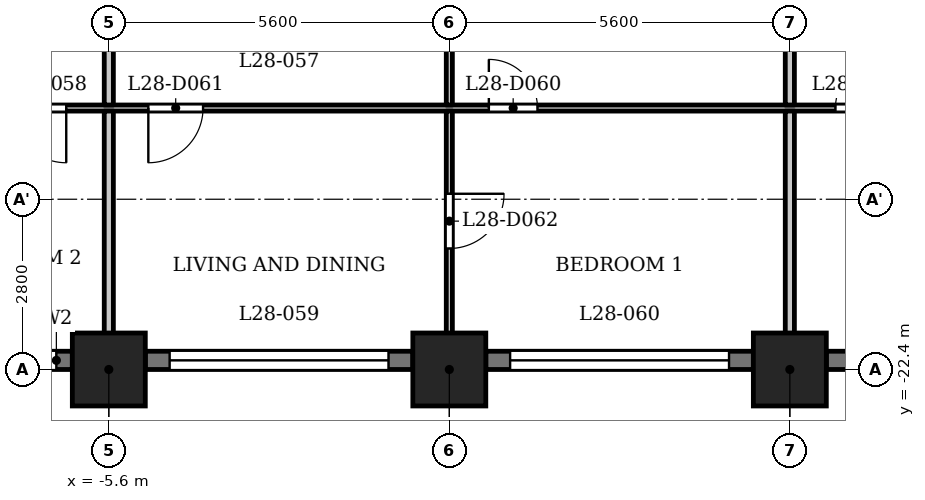
"""IFC4 building model, lengths in metres.
Left out: names, types, materials, properties, quantities, classifications, styles, units other than length and angle.
Written with IfcOpenShell. Run it as: python <this file> out.ifc"""

import sys

from ifc_helpers import new_model, si_unit, direction, frame, frame_2d, origin, origin_2d, place, context, subcontext, project, spatial, rectangle, extrude, element, fill, save


model = new_model("IFC4")
c1 = context("Model", 3, precision=1e-05, world=origin(), true_north=direction((0.0, 1.0)))
c2 = subcontext(c1, "Body", "Model", "MODEL_VIEW")
j1 = project(units=[si_unit("LENGTHUNIT", "METRE"), si_unit("PLANEANGLEUNIT", "RADIAN")], contexts=[c1])
p1 = place(None, origin())
s1 = spatial("IfcSite", under=j1, at=p1, CompositionType="ELEMENT")
p2 = place(p1, origin())
s2 = spatial("IfcBuilding", under=s1, at=p2, CompositionType="ELEMENT")
p3 = place(p2, frame((0.0, 0.0, 111.3)))
s3 = spatial("IfcBuildingStorey", under=s2, at=p3, CompositionType="ELEMENT", Elevation=111.3)
for number, where, z_axis, x_axis in (
    (1, (-5.6, -22.4, 0.0), (0.0, 0.0, 1.0), (1.0, 0.0, 0.0)),
    (2, (0.0, -22.4, 0.0), (0.0, 0.0, 1.0), (1.0, 0.0, 0.0)),
    (3, (5.6, -22.4, 0.0), (0.0, 0.0, 1.0), (1.0, 0.0, 0.0)),
):
    element("IfcColumn", number, at=place(p3, frame(where, z_axis=z_axis, x_axis=x_axis)), inside=s3, PredefinedType="COLUMN", context=c2, shape_type="SweptSolid", body=[
        extrude(rectangle(XDim=1.2, YDim=1.2, at=origin_2d()), origin(), (0.0, 0.0, 1.0), 3.5),
    ])
p4 = place(p3, frame((-10.6, -22.25, 0.0), z_axis=(0.0, 0.0, 1.0), x_axis=(1.0, 0.0, 0.0)))
e4 = element("IfcWall", 4, at=p4, inside=s3, PredefinedType="SOLIDWALL", context=c2, shape_type="SweptSolid", body=[
    extrude(rectangle(XDim=4.4, YDim=0.3, at=frame_2d((2.2, 0.0))), origin(), (0.0, 0.0, 1.0), 2.4),
])
p5 = place(p4, frame((0.363, 0.0, 0.6)))
e5 = element("IfcOpeningElement", 5, at=p5, cuts=e4, PredefinedType="OPENING", context=c2, shape_type="SweptSolid", body=[
    extrude(rectangle(XDim=1.2, YDim=1.55, at=frame_2d((0.6, 0.775))), frame((0.0, 0.16, 0.0), z_axis=(0.0, -1.0, 0.0), x_axis=(1.0, 0.0, 0.0)), (0.0, 0.0, 1.0), 0.32),
])
p6 = place(p4, frame((2.337, 0.0, 0.9)))
e6 = element("IfcOpeningElement", 6, at=p6, cuts=e4, PredefinedType="OPENING", context=c2, shape_type="SweptSolid", body=[
    extrude(rectangle(XDim=1.8, YDim=1.25, at=frame_2d((0.9, 0.625))), frame((0.0, 0.16, 0.0), z_axis=(0.0, -1.0, 0.0), x_axis=(1.0, 0.0, 0.0)), (0.0, 0.0, 1.0), 0.32),
])
p7 = place(p3, frame((-5.0, -22.25, 0.0), z_axis=(0.0, 0.0, 1.0), x_axis=(1.0, 0.0, 0.0)))
e7 = element("IfcWall", 7, at=p7, inside=s3, PredefinedType="SOLIDWALL", context=c2, shape_type="SweptSolid", body=[
    extrude(rectangle(XDim=4.4, YDim=0.3, at=frame_2d((2.2, 0.0))), origin(), (0.0, 0.0, 1.0), 2.4),
])
p8 = place(p7, frame((0.4, 0.0, 1.2)))
e8 = element("IfcOpeningElement", 8, at=p8, cuts=e7, PredefinedType="OPENING", context=c2, shape_type="SweptSolid", body=[
    extrude(rectangle(XDim=3.6, YDim=0.95, at=frame_2d((1.8, 0.475))), frame((0.0, 0.16, 0.0), z_axis=(0.0, -1.0, 0.0), x_axis=(1.0, 0.0, 0.0)), (0.0, 0.0, 1.0), 0.32),
])
p9 = place(p3, frame((0.6, -22.25, 0.0), z_axis=(0.0, 0.0, 1.0), x_axis=(1.0, 0.0, 0.0)))
e9 = element("IfcWall", 9, at=p9, inside=s3, PredefinedType="SOLIDWALL", context=c2, shape_type="SweptSolid", body=[
    extrude(rectangle(XDim=4.4, YDim=0.3, at=frame_2d((2.2, 0.0))), origin(), (0.0, 0.0, 1.0), 2.4),
])
p10 = place(p9, frame((0.4, 0.0, 1.2)))
e10 = element("IfcOpeningElement", 10, at=p10, cuts=e9, PredefinedType="OPENING", context=c2, shape_type="SweptSolid", body=[
    extrude(rectangle(XDim=3.6, YDim=0.95, at=frame_2d((1.8, 0.475))), frame((0.0, 0.16, 0.0), z_axis=(0.0, -1.0, 0.0), x_axis=(1.0, 0.0, 0.0)), (0.0, 0.0, 1.0), 0.32),
])
p11 = place(p3, frame((6.2, -22.25, 0.0), z_axis=(0.0, 0.0, 1.0), x_axis=(1.0, 0.0, 0.0)))
e11 = element("IfcWall", 11, at=p11, inside=s3, PredefinedType="SOLIDWALL", context=c2, shape_type="SweptSolid", body=[
    extrude(rectangle(XDim=4.4, YDim=0.3, at=frame_2d((2.2, 0.0))), origin(), (0.0, 0.0, 1.0), 2.4),
])
p12 = place(p11, frame((0.4, 0.0, 1.2)))
e12 = element("IfcOpeningElement", 12, at=p12, cuts=e11, PredefinedType="OPENING", context=c2, shape_type="SweptSolid", body=[
    extrude(rectangle(XDim=3.6, YDim=0.95, at=frame_2d((1.8, 0.475))), frame((0.0, 0.16, 0.0), z_axis=(0.0, -1.0, 0.0), x_axis=(1.0, 0.0, 0.0)), (0.0, 0.0, 1.0), 0.32),
])
p13 = place(p3, frame((-26.19, -18.1, 0.0), z_axis=(0.0, 0.0, 1.0), x_axis=(1.0, 0.0, 0.0)))
e13 = element("IfcWall", 13, at=p13, inside=s3, PredefinedType="PARTITIONING", context=c2, shape_type="SweptSolid", body=[
    extrude(rectangle(XDim=52.63, YDim=0.1, at=frame_2d((26.315, 0.0))), origin(), (0.0, 0.0, 1.0), 3.2),
])
p14 = place(p13, frame((1.09, 0.0, 0.0)))
e14 = element("IfcOpeningElement", 14, at=p14, cuts=e13, PredefinedType="OPENING", context=c2, shape_type="SweptSolid", body=[
    extrude(rectangle(XDim=0.8, YDim=2.1, at=frame_2d((0.4, 1.05))), frame((0.0, 0.06, 0.0), z_axis=(0.0, -1.0, 0.0), x_axis=(1.0, 0.0, 0.0)), (0.0, 0.0, 1.0), 0.12),
])
p15 = place(p13, frame((4.44, 0.0, 0.0)))
e15 = element("IfcOpeningElement", 15, at=p15, cuts=e13, PredefinedType="OPENING", context=c2, shape_type="SweptSolid", body=[
    extrude(rectangle(XDim=0.9, YDim=2.1, at=frame_2d((0.45, 1.05))), frame((0.0, 0.06, 0.0), z_axis=(0.0, -1.0, 0.0), x_axis=(1.0, 0.0, 0.0)), (0.0, 0.0, 1.0), 0.12),
])
p16 = place(p13, frame((10.14, 0.0, 0.0)))
e16 = element("IfcOpeningElement", 16, at=p16, cuts=e13, PredefinedType="OPENING", context=c2, shape_type="SweptSolid", body=[
    extrude(rectangle(XDim=0.8, YDim=2.1, at=frame_2d((0.4, 1.05))), frame((0.0, 0.06, 0.0), z_axis=(0.0, -1.0, 0.0), x_axis=(1.0, 0.0, 0.0)), (0.0, 0.0, 1.0), 0.12),
])
p17 = place(p13, frame((12.74, 0.0, 0.0)))
e17 = element("IfcOpeningElement", 17, at=p17, cuts=e13, PredefinedType="OPENING", context=c2, shape_type="SweptSolid", body=[
    extrude(rectangle(XDim=0.9, YDim=2.1, at=frame_2d((0.45, 1.05))), frame((0.0, 0.06, 0.0), z_axis=(0.0, -1.0, 0.0), x_axis=(1.0, 0.0, 0.0)), (0.0, 0.0, 1.0), 0.12),
])
p18 = place(p13, frame((16.14, 0.0, 0.0)))
e18 = element("IfcOpeningElement", 18, at=p18, cuts=e13, PredefinedType="OPENING", context=c2, shape_type="SweptSolid", body=[
    extrude(rectangle(XDim=0.9, YDim=2.1, at=frame_2d((0.45, 1.05))), frame((0.0, 0.06, 0.0), z_axis=(0.0, -1.0, 0.0), x_axis=(1.0, 0.0, 0.0)), (0.0, 0.0, 1.0), 0.12),
])
p19 = place(p13, frame((18.99, 0.0, 0.0)))
e19 = element("IfcOpeningElement", 19, at=p19, cuts=e13, PredefinedType="OPENING", context=c2, shape_type="SweptSolid", body=[
    extrude(rectangle(XDim=0.9, YDim=2.1, at=frame_2d((0.45, 1.05))), frame((0.0, 0.06, 0.0), z_axis=(0.0, -1.0, 0.0), x_axis=(1.0, 0.0, 0.0)), (0.0, 0.0, 1.0), 0.12),
])
p20 = place(p13, frame((26.84, 0.0, 0.0)))
e20 = element("IfcOpeningElement", 20, at=p20, cuts=e13, PredefinedType="OPENING", context=c2, shape_type="SweptSolid", body=[
    extrude(rectangle(XDim=0.8, YDim=2.1, at=frame_2d((0.4, 1.05))), frame((0.0, 0.06, 0.0), z_axis=(0.0, -1.0, 0.0), x_axis=(1.0, 0.0, 0.0)), (0.0, 0.0, 1.0), 0.12),
])
p21 = place(p13, frame((21.24, 0.0, 0.0)))
e21 = element("IfcOpeningElement", 21, at=p21, cuts=e13, PredefinedType="OPENING", context=c2, shape_type="SweptSolid", body=[
    extrude(rectangle(XDim=0.9, YDim=2.1, at=frame_2d((0.45, 1.05))), frame((0.0, 0.06, 0.0), z_axis=(0.0, -1.0, 0.0), x_axis=(1.0, 0.0, 0.0)), (0.0, 0.0, 1.0), 0.12),
])
p22 = place(p13, frame((32.54, 0.0, 0.0)))
e22 = element("IfcOpeningElement", 22, at=p22, cuts=e13, PredefinedType="OPENING", context=c2, shape_type="SweptSolid", body=[
    extrude(rectangle(XDim=0.8, YDim=2.1, at=frame_2d((0.4, 1.05))), frame((0.0, 0.06, 0.0), z_axis=(0.0, -1.0, 0.0), x_axis=(1.0, 0.0, 0.0)), (0.0, 0.0, 1.0), 0.12),
])
p23 = place(p13, frame((35.14, 0.0, 0.0)))
e23 = element("IfcOpeningElement", 23, at=p23, cuts=e13, PredefinedType="OPENING", context=c2, shape_type="SweptSolid", body=[
    extrude(rectangle(XDim=0.9, YDim=2.1, at=frame_2d((0.45, 1.05))), frame((0.0, 0.06, 0.0), z_axis=(0.0, -1.0, 0.0), x_axis=(1.0, 0.0, 0.0)), (0.0, 0.0, 1.0), 0.12),
])
p24 = place(p13, frame((38.54, 0.0, 0.0)))
e24 = element("IfcOpeningElement", 24, at=p24, cuts=e13, PredefinedType="OPENING", context=c2, shape_type="SweptSolid", body=[
    extrude(rectangle(XDim=0.9, YDim=2.1, at=frame_2d((0.45, 1.05))), frame((0.0, 0.06, 0.0), z_axis=(0.0, -1.0, 0.0), x_axis=(1.0, 0.0, 0.0)), (0.0, 0.0, 1.0), 0.12),
])
p25 = place(p13, frame((41.39, 0.0, 0.0)))
e25 = element("IfcOpeningElement", 25, at=p25, cuts=e13, PredefinedType="OPENING", context=c2, shape_type="SweptSolid", body=[
    extrude(rectangle(XDim=0.9, YDim=2.1, at=frame_2d((0.45, 1.05))), frame((0.0, 0.06, 0.0), z_axis=(0.0, -1.0, 0.0), x_axis=(1.0, 0.0, 0.0)), (0.0, 0.0, 1.0), 0.12),
])
p26 = place(p13, frame((49.204, 0.0, 0.0)))
e26 = element("IfcOpeningElement", 26, at=p26, cuts=e13, PredefinedType="OPENING", context=c2, shape_type="SweptSolid", body=[
    extrude(rectangle(XDim=0.8, YDim=2.1, at=frame_2d((0.4, 1.05))), frame((0.0, 0.06, 0.0), z_axis=(0.0, -1.0, 0.0), x_axis=(1.0, 0.0, 0.0)), (0.0, 0.0, 1.0), 0.12),
])
p27 = place(p13, frame((43.64, 0.0, 0.0)))
e27 = element("IfcOpeningElement", 27, at=p27, cuts=e13, PredefinedType="OPENING", context=c2, shape_type="SweptSolid", body=[
    extrude(rectangle(XDim=0.9, YDim=2.1, at=frame_2d((0.45, 1.05))), frame((0.0, 0.06, 0.0), z_axis=(0.0, -1.0, 0.0), x_axis=(1.0, 0.0, 0.0)), (0.0, 0.0, 1.0), 0.12),
])
p28 = place(p3, frame((-5.6, -22.98, 0.0), z_axis=(0.0, 0.0, 1.0), x_axis=(0.0, 1.0, 0.0)))
e28 = element("IfcWall", 28, at=p28, inside=s3, PredefinedType="PARTITIONING", context=c2, shape_type="SweptSolid", body=[
    extrude(rectangle(XDim=4.83, YDim=0.15, at=frame_2d((2.415, 0.0))), origin(), (0.0, 0.0, 1.0), 3.2),
])
p29 = place(p3, frame((-5.6, -18.05, 0.0), z_axis=(0.0, 0.0, 1.0), x_axis=(0.0, 1.0, 0.0)))
e29 = element("IfcWall", 29, at=p29, inside=s3, PredefinedType="PARTITIONING", context=c2, shape_type="SweptSolid", body=[
    extrude(rectangle(XDim=2.575, YDim=0.15, at=frame_2d((1.288, 0.0))), origin(), (0.0, 0.0, 1.0), 3.2),
])
p30 = place(p3, frame((0.0, -22.98, 0.0), z_axis=(0.0, 0.0, 1.0), x_axis=(0.0, 1.0, 0.0)))
e30 = element("IfcWall", 30, at=p30, inside=s3, PredefinedType="PARTITIONING", context=c2, shape_type="SweptSolid", body=[
    extrude(rectangle(XDim=4.83, YDim=0.1, at=frame_2d((2.415, 0.0))), origin(), (0.0, 0.0, 1.0), 3.2),
])
p31 = place(p30, frame((2.57, 0.0, 0.0)))
e31 = element("IfcOpeningElement", 31, at=p31, cuts=e30, PredefinedType="OPENING", context=c2, shape_type="SweptSolid", body=[
    extrude(rectangle(XDim=0.9, YDim=2.1, at=frame_2d((0.45, 1.05))), frame((0.0, 0.06, 0.0), z_axis=(0.0, -1.0, 0.0), x_axis=(1.0, 0.0, 0.0)), (0.0, 0.0, 1.0), 0.12),
])
p32 = place(p3, frame((0.0, -18.05, 0.0), z_axis=(0.0, 0.0, 1.0), x_axis=(0.0, 1.0, 0.0)))
e32 = element("IfcWall", 32, at=p32, inside=s3, PredefinedType="PARTITIONING", context=c2, shape_type="SweptSolid", body=[
    extrude(rectangle(XDim=2.575, YDim=0.1, at=frame_2d((1.288, 0.0))), origin(), (0.0, 0.0, 1.0), 3.2),
])
p33 = place(p3, frame((5.6, -22.98, 0.0), z_axis=(0.0, 0.0, 1.0), x_axis=(0.0, 1.0, 0.0)))
e33 = element("IfcWall", 33, at=p33, inside=s3, PredefinedType="PARTITIONING", context=c2, shape_type="SweptSolid", body=[
    extrude(rectangle(XDim=4.83, YDim=0.15, at=frame_2d((2.415, 0.0))), origin(), (0.0, 0.0, 1.0), 3.2),
])
p34 = place(p3, frame((5.6, -18.05, 0.0), z_axis=(0.0, 0.0, 1.0), x_axis=(0.0, 1.0, 0.0)))
e34 = element("IfcWall", 34, at=p34, inside=s3, PredefinedType="PARTITIONING", context=c2, shape_type="SweptSolid", body=[
    extrude(rectangle(XDim=2.575, YDim=0.15, at=frame_2d((1.288, 0.0))), origin(), (0.0, 0.0, 1.0), 3.2),
])
p35 = place(p19, origin())
e35 = element("IfcDoor", 35, at=p35, inside=s3, OperationType="SINGLE_SWING_RIGHT", PredefinedType="DOOR", context=c2, shape_type="SweptSolid", body=[
    extrude(rectangle(XDim=0.9, YDim=2.1, at=frame_2d((0.45, 1.05))), frame((0.0, 0.025, 0.0), z_axis=(0.0, -1.0, 0.0), x_axis=(1.0, 0.0, 0.0)), (0.0, 0.0, 1.0), 0.05),
])
fill(e19, e35)
p36 = place(p20, origin())
e36 = element("IfcDoor", 36, at=p36, inside=s3, OperationType="SINGLE_SWING_RIGHT", PredefinedType="DOOR", context=c2, shape_type="SweptSolid", body=[
    extrude(rectangle(XDim=0.8, YDim=2.1, at=frame_2d((0.4, 1.05))), frame((0.0, 0.025, 0.0), z_axis=(0.0, -1.0, 0.0), x_axis=(1.0, 0.0, 0.0)), (0.0, 0.0, 1.0), 0.05),
])
fill(e20, e36)
p37 = place(p21, origin())
e37 = element("IfcDoor", 37, at=p37, inside=s3, OperationType="SINGLE_SWING_LEFT", PredefinedType="DOOR", context=c2, shape_type="SweptSolid", body=[
    extrude(rectangle(XDim=0.9, YDim=2.1, at=frame_2d((0.45, 1.05))), frame((0.0, 0.025, 0.0), z_axis=(0.0, -1.0, 0.0), x_axis=(1.0, 0.0, 0.0)), (0.0, 0.0, 1.0), 0.05),
])
fill(e21, e37)
p38 = place(p31, origin())
e38 = element("IfcDoor", 38, at=p38, inside=s3, OperationType="SINGLE_SWING_RIGHT", PredefinedType="DOOR", context=c2, shape_type="SweptSolid", body=[
    extrude(rectangle(XDim=0.9, YDim=2.1, at=frame_2d((0.45, 1.05))), frame((0.0, 0.025, 0.0), z_axis=(0.0, -1.0, 0.0), x_axis=(1.0, 0.0, 0.0)), (0.0, 0.0, 1.0), 0.05),
])
fill(e31, e38)
p39 = place(p22, origin())
e39 = element("IfcDoor", 39, at=p39, inside=s3, OperationType="SINGLE_SWING_LEFT", PredefinedType="DOOR", context=c2, shape_type="SweptSolid", body=[
    extrude(rectangle(XDim=0.8, YDim=2.1, at=frame_2d((0.4, 1.05))), frame((0.0, 0.025, 0.0), z_axis=(0.0, -1.0, 0.0), x_axis=(1.0, 0.0, 0.0)), (0.0, 0.0, 1.0), 0.05),
])
fill(e22, e39)
p40 = place(p6, origin())
e40 = element("IfcWindow", 40, at=p40, inside=s3, PartitioningType="SINGLE_PANEL", PredefinedType="WINDOW", context=c2, shape_type="SweptSolid", body=[
    extrude(rectangle(XDim=1.8, YDim=1.25, at=frame_2d((0.9, 0.625))), frame((0.0, 0.03, 0.0), z_axis=(0.0, -1.0, 0.0), x_axis=(1.0, 0.0, 0.0)), (0.0, 0.0, 1.0), 0.06),
])
fill(e6, e40)
p41 = place(p8, origin())
e41 = element("IfcWindow", 41, at=p41, inside=s3, PartitioningType="SINGLE_PANEL", PredefinedType="WINDOW", context=c2, shape_type="SweptSolid", body=[
    extrude(rectangle(XDim=3.6, YDim=0.95, at=frame_2d((1.8, 0.475))), frame((0.0, 0.03, 0.0), z_axis=(0.0, -1.0, 0.0), x_axis=(1.0, 0.0, 0.0)), (0.0, 0.0, 1.0), 0.06),
])
fill(e8, e41)
p42 = place(p10, origin())
e42 = element("IfcWindow", 42, at=p42, inside=s3, PartitioningType="SINGLE_PANEL", PredefinedType="WINDOW", context=c2, shape_type="SweptSolid", body=[
    extrude(rectangle(XDim=3.6, YDim=0.95, at=frame_2d((1.8, 0.475))), frame((0.0, 0.03, 0.0), z_axis=(0.0, -1.0, 0.0), x_axis=(1.0, 0.0, 0.0)), (0.0, 0.0, 1.0), 0.06),
])
fill(e10, e42)
save(model, sys.argv[1])
